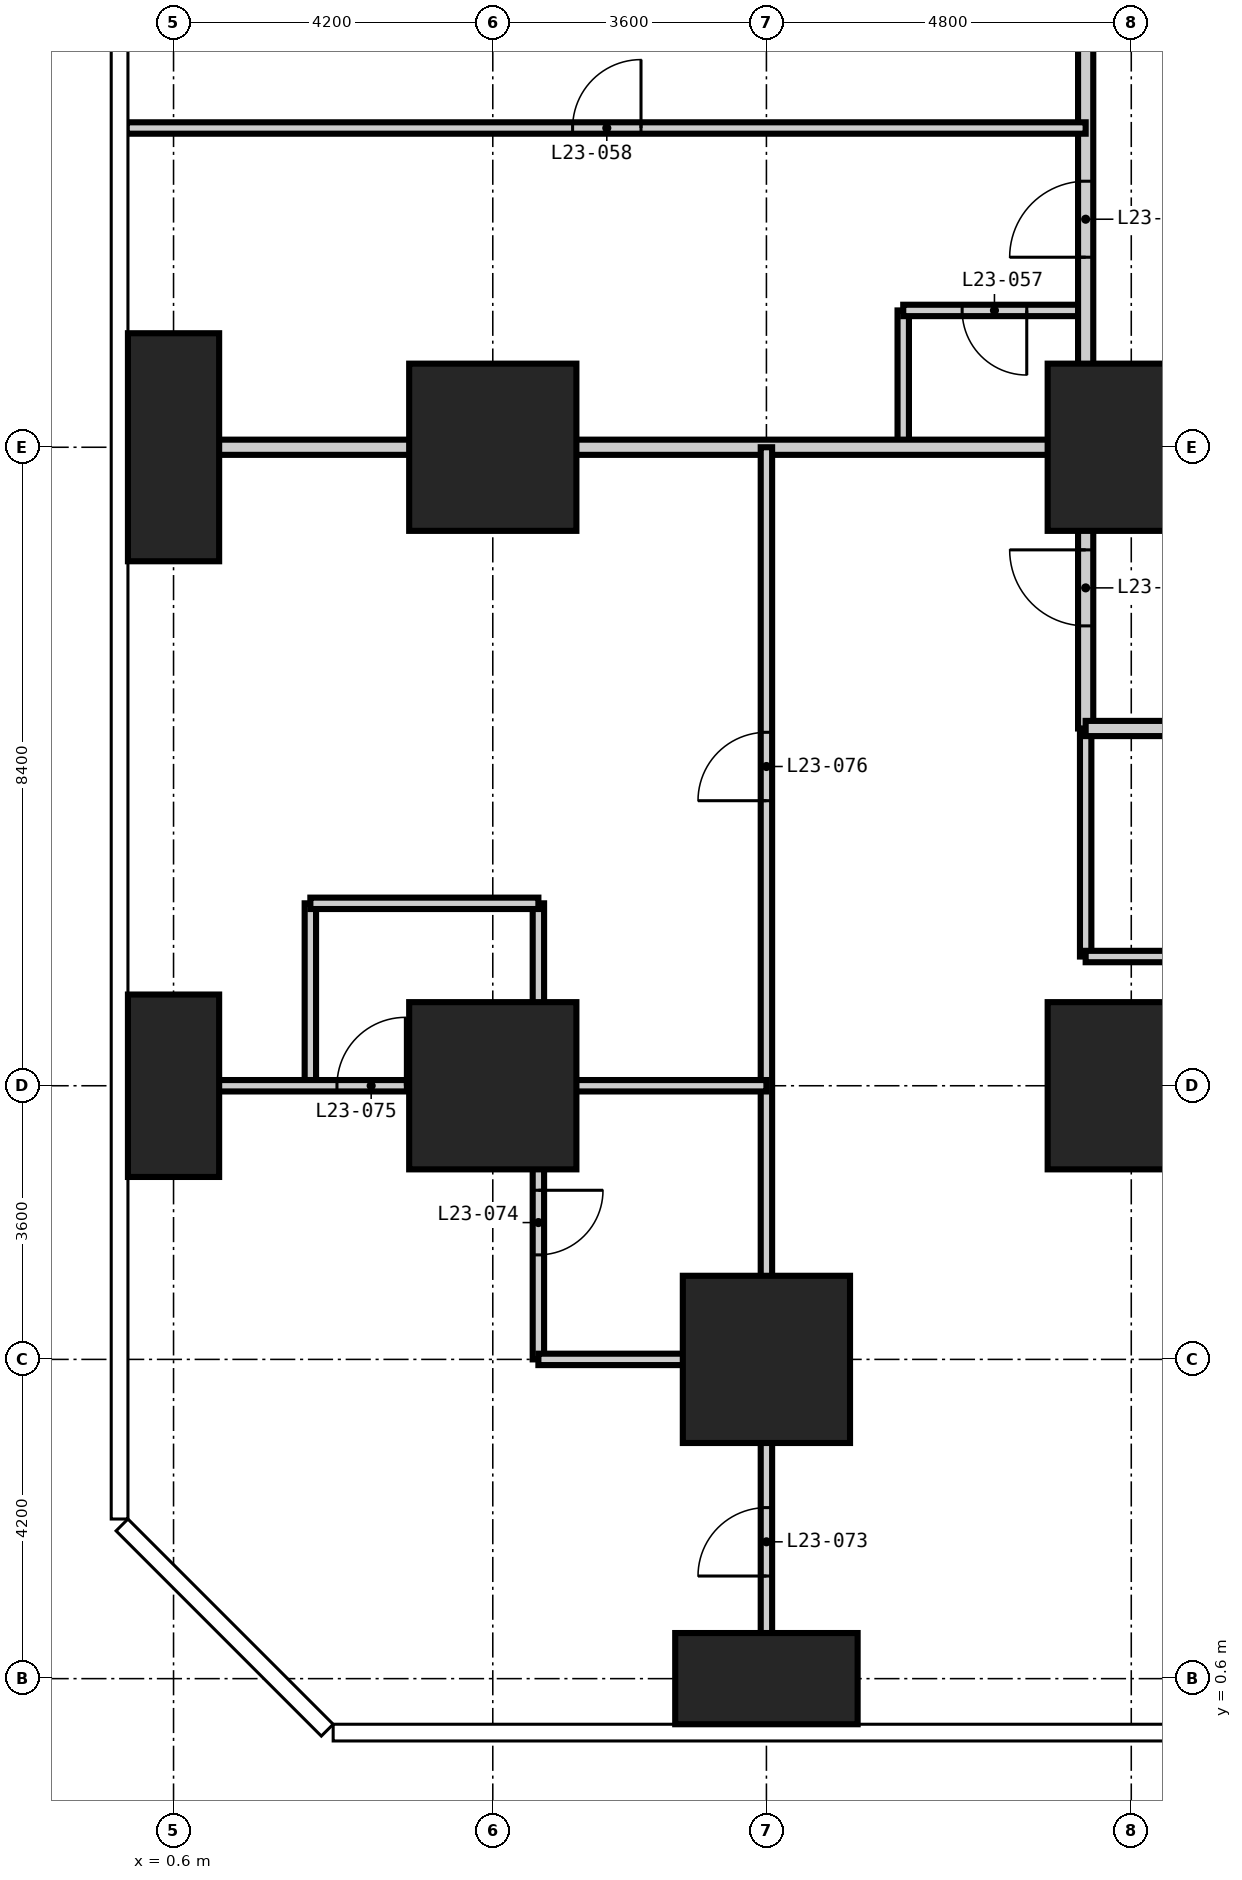
"""IFC4 building model, lengths in metres.
Left out: names, types, materials, properties, quantities, classifications, styles, units other than length and angle.
Written with IfcOpenShell. Run it as: python <this file> out.ifc"""

import sys

from ifc_helpers import new_model, si_unit, direction, frame, frame_2d, origin, origin_2d, place, context, subcontext, project, spatial, rectangle, extrude, element, fill, save


model = new_model("IFC4")
c1 = context("Model", 3, precision=1e-05, world=origin(), true_north=direction((0.0, 1.0)))
c2 = subcontext(c1, "Body", "Model", "MODEL_VIEW")
j1 = project(units=[si_unit("LENGTHUNIT", "METRE"), si_unit("PLANEANGLEUNIT", "RADIAN")], contexts=[c1])
p1 = place(None, origin())
s1 = spatial("IfcSite", under=j1, at=p1, CompositionType="ELEMENT")
p2 = place(p1, origin())
s2 = spatial("IfcBuilding", under=s1, at=p2, CompositionType="ELEMENT")
p3 = place(p2, frame((0.0, 0.0, 93.6)))
s3 = spatial("IfcBuildingStorey", under=s2, at=p3, CompositionType="ELEMENT", Elevation=93.6)
p4 = place(p3, frame((0.6, 8.4, -0.35), z_axis=(0.0, 0.0, 1.0), x_axis=(1.0, 0.0, 0.0)))
e1 = element("IfcColumn", 1, at=p4, inside=s3, PredefinedType="COLUMN", context=c2, shape_type="SweptSolid", body=[
    extrude(rectangle(XDim=1.2, YDim=2.4, at=origin_2d()), origin(), (0.0, 0.0, 1.0), 3.6),
])
p5 = place(p3, frame((0.6, 16.8, -0.35), z_axis=(0.0, 0.0, 1.0), x_axis=(1.0, 0.0, 0.0)))
e2 = element("IfcColumn", 2, at=p5, inside=s3, PredefinedType="COLUMN", context=c2, shape_type="SweptSolid", body=[
    extrude(rectangle(XDim=1.2, YDim=3.0, at=origin_2d()), origin(), (0.0, 0.0, 1.0), 3.6),
])
for number, where, z_axis, x_axis in (
    (3, (4.8, 8.4, -0.35), (0.0, 0.0, 1.0), (1.0, 0.0, 0.0)),
    (4, (4.8, 16.8, -0.35), (0.0, 0.0, 1.0), (1.0, 0.0, 0.0)),
):
    element("IfcColumn", number, at=place(p3, frame(where, z_axis=z_axis, x_axis=x_axis)), inside=s3, PredefinedType="COLUMN", context=c2, shape_type="SweptSolid", body=[
        extrude(rectangle(XDim=2.2, YDim=2.2, at=origin_2d()), origin(), (0.0, 0.0, 1.0), 3.6),
    ])
p6 = place(p3, frame((8.4, 0.6, -0.35), z_axis=(0.0, 0.0, 1.0), x_axis=(1.0, 0.0, 0.0)))
e5 = element("IfcColumn", 5, at=p6, inside=s3, PredefinedType="COLUMN", context=c2, shape_type="SweptSolid", body=[
    extrude(rectangle(XDim=2.4, YDim=1.2, at=origin_2d()), origin(), (0.0, 0.0, 1.0), 3.6),
])
for number, where, z_axis, x_axis in (
    (6, (8.4, 4.8, -0.35), (0.0, 0.0, 1.0), (1.0, 0.0, 0.0)),
    (7, (13.2, 8.4, -0.35), (0.0, 0.0, 1.0), (1.0, 0.0, 0.0)),
    (8, (13.2, 16.8, -0.35), (0.0, 0.0, 1.0), (1.0, 0.0, 0.0)),
):
    element("IfcColumn", number, at=place(p3, frame(where, z_axis=z_axis, x_axis=x_axis)), inside=s3, PredefinedType="COLUMN", context=c2, shape_type="SweptSolid", body=[
        extrude(rectangle(XDim=2.2, YDim=2.2, at=origin_2d()), origin(), (0.0, 0.0, 1.0), 3.6),
    ])
p7 = place(p3, frame((5.4, 4.8, 0.0), z_axis=(0.0, 0.0, 1.0), x_axis=(0.0, 1.0, 0.0)))
e9 = element("IfcWall", 9, at=p7, inside=s3, PredefinedType="PARTITIONING", context=c2, shape_type="SweptSolid", body=[
    extrude(rectangle(XDim=3.6, YDim=0.15, at=frame_2d((1.8, 0.0))), origin(), (0.0, 0.0, 1.0), 3.25),
])
p8 = place(p7, frame((1.375, 0.0, 0.0)))
e10 = element("IfcOpeningElement", 10, at=p8, cuts=e9, PredefinedType="OPENING", context=c2, shape_type="SweptSolid", body=[
    extrude(rectangle(XDim=0.85, YDim=2.1, at=frame_2d((0.425, 1.05))), frame((0.0, 0.085, 0.0), z_axis=(0.0, -1.0, 0.0), x_axis=(1.0, 0.0, 0.0)), (0.0, 0.0, 1.0), 0.17),
])
p9 = place(p3, frame((10.2, 16.8, 0.0), z_axis=(0.0, 0.0, 1.0), x_axis=(0.0, 1.0, 0.0)))
e11 = element("IfcWall", 11, at=p9, inside=s3, PredefinedType="PARTITIONING", context=c2, shape_type="SweptSolid", body=[
    extrude(rectangle(XDim=1.8, YDim=0.15, at=frame_2d((0.9, 0.0))), origin(), (0.0, 0.0, 1.0), 3.25),
])
for number, where, z_axis, x_axis in (
    (12, (12.6, 10.1, 0.0), (0.0, 0.0, 1.0), (0.0, 1.0, 0.0)),
    (13, (5.4, 4.8, 0.0), (0.0, 0.0, 1.0), (1.0, 0.0, 0.0)),
):
    element("IfcWall", number, at=place(p3, frame(where, z_axis=z_axis, x_axis=x_axis)), inside=s3, PredefinedType="PARTITIONING", context=c2, shape_type="SweptSolid", body=[
        extrude(rectangle(XDim=3.0, YDim=0.15, at=frame_2d((1.5, 0.0))), origin(), (0.0, 0.0, 1.0), 3.25),
    ])
p10 = place(p3, frame((12.6, 10.1, 0.0), z_axis=(0.0, 0.0, 1.0), x_axis=(1.0, 0.0, 0.0)))
e14 = element("IfcWall", 14, at=p10, inside=s3, PredefinedType="PARTITIONING", context=c2, shape_type="SweptSolid", body=[
    extrude(rectangle(XDim=4.2, YDim=0.15, at=frame_2d((2.1, 0.0))), origin(), (0.0, 0.0, 1.0), 3.25),
])
p11 = place(p10, frame((1.675, 0.0, 0.0)))
e15 = element("IfcOpeningElement", 15, at=p11, cuts=e14, PredefinedType="OPENING", context=c2, shape_type="SweptSolid", body=[
    extrude(rectangle(XDim=0.85, YDim=2.1, at=frame_2d((0.425, 1.05))), frame((0.0, 0.085, 0.0), z_axis=(0.0, -1.0, 0.0), x_axis=(1.0, 0.0, 0.0)), (0.0, 0.0, 1.0), 0.17),
])
p12 = place(p3, frame((10.2, 18.6, 0.0), z_axis=(0.0, 0.0, 1.0), x_axis=(1.0, 0.0, 0.0)))
e16 = element("IfcWall", 16, at=p12, inside=s3, PredefinedType="PARTITIONING", context=c2, shape_type="SweptSolid", body=[
    extrude(rectangle(XDim=2.4, YDim=0.15, at=frame_2d((1.2, 0.0))), origin(), (0.0, 0.0, 1.0), 3.25),
])
p13 = place(p12, frame((0.775, 0.0, 0.0)))
e17 = element("IfcOpeningElement", 17, at=p13, cuts=e16, PredefinedType="OPENING", context=c2, shape_type="SweptSolid", body=[
    extrude(rectangle(XDim=0.85, YDim=2.1, at=frame_2d((0.425, 1.05))), frame((0.0, 0.085, 0.0), z_axis=(0.0, -1.0, 0.0), x_axis=(1.0, 0.0, 0.0)), (0.0, 0.0, 1.0), 0.17),
])
p14 = place(p3, frame((12.6, 13.1, 0.0), z_axis=(0.0, 0.0, 1.0), x_axis=(0.0, 1.0, 0.0)))
e18 = element("IfcWall", 18, at=p14, inside=s3, PredefinedType="PARTITIONING", context=c2, shape_type="SweptSolid", body=[
    extrude(rectangle(XDim=31.4, YDim=0.2, at=frame_2d((15.7, 0.0))), origin(), (0.0, 0.0, 1.0), 3.25),
])
p15 = place(p14, frame((6.2, 0.0, 0.0)))
e19 = element("IfcOpeningElement", 19, at=p15, cuts=e18, PredefinedType="OPENING", context=c2, shape_type="SweptSolid", body=[
    extrude(rectangle(XDim=1.0, YDim=2.2, at=frame_2d((0.5, 1.1))), frame((0.0, 0.11, 0.0), z_axis=(0.0, -1.0, 0.0), x_axis=(1.0, 0.0, 0.0)), (0.0, 0.0, 1.0), 0.22),
])
p16 = place(p14, frame((17.0, 0.0, 0.0)))
e20 = element("IfcOpeningElement", 20, at=p16, cuts=e18, PredefinedType="OPENING", context=c2, shape_type="SweptSolid", body=[
    extrude(rectangle(XDim=1.0, YDim=2.2, at=frame_2d((0.5, 1.1))), frame((0.0, 0.11, 0.0), z_axis=(0.0, -1.0, 0.0), x_axis=(1.0, 0.0, 0.0)), (0.0, 0.0, 1.0), 0.22),
])
p17 = place(p14, frame((23.0, 0.0, 0.0)))
e21 = element("IfcOpeningElement", 21, at=p17, cuts=e18, PredefinedType="OPENING", context=c2, shape_type="SweptSolid", body=[
    extrude(rectangle(XDim=1.0, YDim=2.2, at=frame_2d((0.5, 1.1))), frame((0.0, 0.11, 0.0), z_axis=(0.0, -1.0, 0.0), x_axis=(1.0, 0.0, 0.0)), (0.0, 0.0, 1.0), 0.22),
])
p18 = place(p14, frame((1.35, 0.0, 0.0)))
e22 = element("IfcOpeningElement", 22, at=p18, cuts=e18, PredefinedType="OPENING", context=c2, shape_type="SweptSolid", body=[
    extrude(rectangle(XDim=1.0, YDim=2.2, at=frame_2d((0.5, 1.1))), frame((0.0, 0.11, 0.0), z_axis=(0.0, -1.0, 0.0), x_axis=(1.0, 0.0, 0.0)), (0.0, 0.0, 1.0), 0.22),
])
p19 = place(p14, frame((30.05, 0.0, 0.0)))
e23 = element("IfcOpeningElement", 23, at=p19, cuts=e18, PredefinedType="OPENING", context=c2, shape_type="SweptSolid", body=[
    extrude(rectangle(XDim=1.0, YDim=2.2, at=frame_2d((0.5, 1.1))), frame((0.0, 0.11, 0.0), z_axis=(0.0, -1.0, 0.0), x_axis=(1.0, 0.0, 0.0)), (0.0, 0.0, 1.0), 0.22),
])
p20 = place(p3, frame((45.1, 13.1, 0.0), z_axis=(0.0, 0.0, 1.0), x_axis=(-1.0, 0.0, 0.0)))
e24 = element("IfcWall", 24, at=p20, inside=s3, PredefinedType="PARTITIONING", context=c2, shape_type="SweptSolid", body=[
    extrude(rectangle(XDim=32.5, YDim=0.2, at=frame_2d((16.25, 0.0))), origin(), (0.0, 0.0, 1.0), 3.25),
])
p21 = place(p20, frame((24.8, 0.0, 0.0)))
e25 = element("IfcOpeningElement", 25, at=p21, cuts=e24, PredefinedType="OPENING", context=c2, shape_type="SweptSolid", body=[
    extrude(rectangle(XDim=1.0, YDim=2.2, at=frame_2d((0.5, 1.1))), frame((0.0, 0.11, 0.0), z_axis=(0.0, -1.0, 0.0), x_axis=(1.0, 0.0, 0.0)), (0.0, 0.0, 1.0), 0.22),
])
p22 = place(p20, frame((14.0, 0.0, 0.0)))
e26 = element("IfcOpeningElement", 26, at=p22, cuts=e24, PredefinedType="OPENING", context=c2, shape_type="SweptSolid", body=[
    extrude(rectangle(XDim=1.0, YDim=2.2, at=frame_2d((0.5, 1.1))), frame((0.0, 0.11, 0.0), z_axis=(0.0, -1.0, 0.0), x_axis=(1.0, 0.0, 0.0)), (0.0, 0.0, 1.0), 0.22),
])
p23 = place(p20, frame((8.0, 0.0, 0.0)))
e27 = element("IfcOpeningElement", 27, at=p23, cuts=e24, PredefinedType="OPENING", context=c2, shape_type="SweptSolid", body=[
    extrude(rectangle(XDim=1.0, YDim=2.2, at=frame_2d((0.5, 1.1))), frame((0.0, 0.11, 0.0), z_axis=(0.0, -1.0, 0.0), x_axis=(1.0, 0.0, 0.0)), (0.0, 0.0, 1.0), 0.22),
])
p24 = place(p3, frame((-0.018, 16.8, 0.0), z_axis=(0.0, 0.0, 1.0), x_axis=(1.0, 0.0, 0.0)))
e28 = element("IfcWall", 28, at=p24, inside=s3, PredefinedType="PARTITIONING", context=c2, shape_type="SweptSolid", body=[
    extrude(rectangle(XDim=12.618, YDim=0.2, at=frame_2d((6.309, 0.0))), origin(), (0.0, 0.0, 1.0), 3.25),
])
for number, where, z_axis, x_axis in (
    (29, (2.4, 8.4, 0.0), (0.0, 0.0, 1.0), (0.0, 1.0, 0.0)),
    (30, (5.4, 8.4, 0.0), (0.0, 0.0, 1.0), (0.0, 1.0, 0.0)),
):
    element("IfcWall", number, at=place(p3, frame(where, z_axis=z_axis, x_axis=x_axis)), inside=s3, PredefinedType="PARTITIONING", context=c2, shape_type="SweptSolid", body=[
        extrude(rectangle(XDim=2.4, YDim=0.15, at=frame_2d((1.2, 0.0))), origin(), (0.0, 0.0, 1.0), 3.25),
    ])
p25 = place(p3, frame((8.4, -0.018, 0.0), z_axis=(0.0, 0.0, 1.0), x_axis=(0.0, 1.0, 0.0)))
e31 = element("IfcWall", 31, at=p25, inside=s3, PredefinedType="PARTITIONING", context=c2, shape_type="SweptSolid", body=[
    extrude(rectangle(XDim=16.818, YDim=0.15, at=frame_2d((8.409, 0.0))), origin(), (0.0, 0.0, 1.0), 3.25),
])
p26 = place(p25, frame((1.968, 0.0, 0.0)))
e32 = element("IfcOpeningElement", 32, at=p26, cuts=e31, PredefinedType="OPENING", context=c2, shape_type="SweptSolid", body=[
    extrude(rectangle(XDim=0.9, YDim=2.1, at=frame_2d((0.45, 1.05))), frame((0.0, 0.085, 0.0), z_axis=(0.0, -1.0, 0.0), x_axis=(1.0, 0.0, 0.0)), (0.0, 0.0, 1.0), 0.17),
])
p27 = place(p25, frame((12.168, 0.0, 0.0)))
e33 = element("IfcOpeningElement", 33, at=p27, cuts=e31, PredefinedType="OPENING", context=c2, shape_type="SweptSolid", body=[
    extrude(rectangle(XDim=0.9, YDim=2.1, at=frame_2d((0.45, 1.05))), frame((0.0, 0.085, 0.0), z_axis=(0.0, -1.0, 0.0), x_axis=(1.0, 0.0, 0.0)), (0.0, 0.0, 1.0), 0.17),
])
p28 = place(p3, frame((-0.018, 8.4, 0.0), z_axis=(0.0, 0.0, 1.0), x_axis=(1.0, 0.0, 0.0)))
e34 = element("IfcWall", 34, at=p28, inside=s3, PredefinedType="PARTITIONING", context=c2, shape_type="SweptSolid", body=[
    extrude(rectangle(XDim=8.418, YDim=0.15, at=frame_2d((4.209, 0.0))), origin(), (0.0, 0.0, 1.0), 3.25),
])
p29 = place(p28, frame((2.768, 0.0, 0.0)))
e35 = element("IfcOpeningElement", 35, at=p29, cuts=e34, PredefinedType="OPENING", context=c2, shape_type="SweptSolid", body=[
    extrude(rectangle(XDim=0.9, YDim=2.1, at=frame_2d((0.45, 1.05))), frame((0.0, 0.085, 0.0), z_axis=(0.0, -1.0, 0.0), x_axis=(1.0, 0.0, 0.0)), (0.0, 0.0, 1.0), 0.17),
])
p30 = place(p3, frame((2.4, 10.8, 0.0), z_axis=(0.0, 0.0, 1.0), x_axis=(1.0, 0.0, 0.0)))
e36 = element("IfcWall", 36, at=p30, inside=s3, PredefinedType="PARTITIONING", context=c2, shape_type="SweptSolid", body=[
    extrude(rectangle(XDim=3.0, YDim=0.15, at=frame_2d((1.5, 0.0))), origin(), (0.0, 0.0, 1.0), 3.25),
])
p31 = place(p3, frame((-0.018, 21.0, 0.0), z_axis=(0.0, 0.0, 1.0), x_axis=(1.0, 0.0, 0.0)))
e37 = element("IfcWall", 37, at=p31, inside=s3, PredefinedType="PARTITIONING", context=c2, shape_type="SweptSolid", body=[
    extrude(rectangle(XDim=12.618, YDim=0.15, at=frame_2d((6.309, 0.0))), origin(), (0.0, 0.0, 1.0), 3.25),
])
p32 = place(p31, frame((5.868, 0.0, 0.0)))
e38 = element("IfcOpeningElement", 38, at=p32, cuts=e37, PredefinedType="OPENING", context=c2, shape_type="SweptSolid", body=[
    extrude(rectangle(XDim=0.9, YDim=2.1, at=frame_2d((0.45, 1.05))), frame((0.0, 0.085, 0.0), z_axis=(0.0, -1.0, 0.0), x_axis=(1.0, 0.0, 0.0)), (0.0, 0.0, 1.0), 0.17),
])
p33 = place(p15, origin())
e39 = element("IfcDoor", 39, at=p33, inside=s3, OperationType="SINGLE_SWING_LEFT", PredefinedType="DOOR", context=c2, shape_type="SweptSolid", body=[
    extrude(rectangle(XDim=1.0, YDim=2.2, at=frame_2d((0.5, 1.1))), frame((0.0, 0.025, 0.0), z_axis=(0.0, -1.0, 0.0), x_axis=(1.0, 0.0, 0.0)), (0.0, 0.0, 1.0), 0.05),
])
fill(e19, e39)
p34 = place(p13, frame((0.85, 0.0, 0.0), z_axis=(0.0, 0.0, 1.0), x_axis=(-1.0, 0.0, 0.0)))
e40 = element("IfcDoor", 40, at=p34, inside=s3, OperationType="SINGLE_SWING_LEFT", PredefinedType="DOOR", context=c2, shape_type="SweptSolid", body=[
    extrude(rectangle(XDim=0.85, YDim=2.1, at=frame_2d((0.425, 1.05))), frame((0.0, 0.025, 0.0), z_axis=(0.0, -1.0, 0.0), x_axis=(1.0, 0.0, 0.0)), (0.0, 0.0, 1.0), 0.05),
])
fill(e17, e40)
p35 = place(p32, origin())
e41 = element("IfcDoor", 41, at=p35, inside=s3, OperationType="SINGLE_SWING_RIGHT", PredefinedType="DOOR", context=c2, shape_type="SweptSolid", body=[
    extrude(rectangle(XDim=0.9, YDim=2.1, at=frame_2d((0.45, 1.05))), frame((0.0, 0.025, 0.0), z_axis=(0.0, -1.0, 0.0), x_axis=(1.0, 0.0, 0.0)), (0.0, 0.0, 1.0), 0.05),
])
fill(e38, e41)
p36 = place(p18, origin())
e42 = element("IfcDoor", 42, at=p36, inside=s3, OperationType="SINGLE_SWING_RIGHT", PredefinedType="DOOR", context=c2, shape_type="SweptSolid", body=[
    extrude(rectangle(XDim=1.0, YDim=2.2, at=frame_2d((0.5, 1.1))), frame((0.0, 0.025, 0.0), z_axis=(0.0, -1.0, 0.0), x_axis=(1.0, 0.0, 0.0)), (0.0, 0.0, 1.0), 0.05),
])
fill(e22, e42)
p37 = place(p26, origin())
e43 = element("IfcDoor", 43, at=p37, inside=s3, OperationType="SINGLE_SWING_LEFT", PredefinedType="DOOR", context=c2, shape_type="SweptSolid", body=[
    extrude(rectangle(XDim=0.9, YDim=2.1, at=frame_2d((0.45, 1.05))), frame((0.0, 0.025, 0.0), z_axis=(0.0, -1.0, 0.0), x_axis=(1.0, 0.0, 0.0)), (0.0, 0.0, 1.0), 0.05),
])
fill(e32, e43)
p38 = place(p8, frame((0.85, 0.0, 0.0), z_axis=(0.0, 0.0, 1.0), x_axis=(-1.0, 0.0, 0.0)))
e44 = element("IfcDoor", 44, at=p38, inside=s3, OperationType="SINGLE_SWING_LEFT", PredefinedType="DOOR", context=c2, shape_type="SweptSolid", body=[
    extrude(rectangle(XDim=0.85, YDim=2.1, at=frame_2d((0.425, 1.05))), frame((0.0, 0.025, 0.0), z_axis=(0.0, -1.0, 0.0), x_axis=(1.0, 0.0, 0.0)), (0.0, 0.0, 1.0), 0.05),
])
fill(e10, e44)
p39 = place(p29, origin())
e45 = element("IfcDoor", 45, at=p39, inside=s3, OperationType="SINGLE_SWING_RIGHT", PredefinedType="DOOR", context=c2, shape_type="SweptSolid", body=[
    extrude(rectangle(XDim=0.9, YDim=2.1, at=frame_2d((0.45, 1.05))), frame((0.0, 0.025, 0.0), z_axis=(0.0, -1.0, 0.0), x_axis=(1.0, 0.0, 0.0)), (0.0, 0.0, 1.0), 0.05),
])
fill(e35, e45)
p40 = place(p27, origin())
e46 = element("IfcDoor", 46, at=p40, inside=s3, OperationType="SINGLE_SWING_LEFT", PredefinedType="DOOR", context=c2, shape_type="SweptSolid", body=[
    extrude(rectangle(XDim=0.9, YDim=2.1, at=frame_2d((0.45, 1.05))), frame((0.0, 0.025, 0.0), z_axis=(0.0, -1.0, 0.0), x_axis=(1.0, 0.0, 0.0)), (0.0, 0.0, 1.0), 0.05),
])
fill(e33, e46)
save(model, sys.argv[1])
